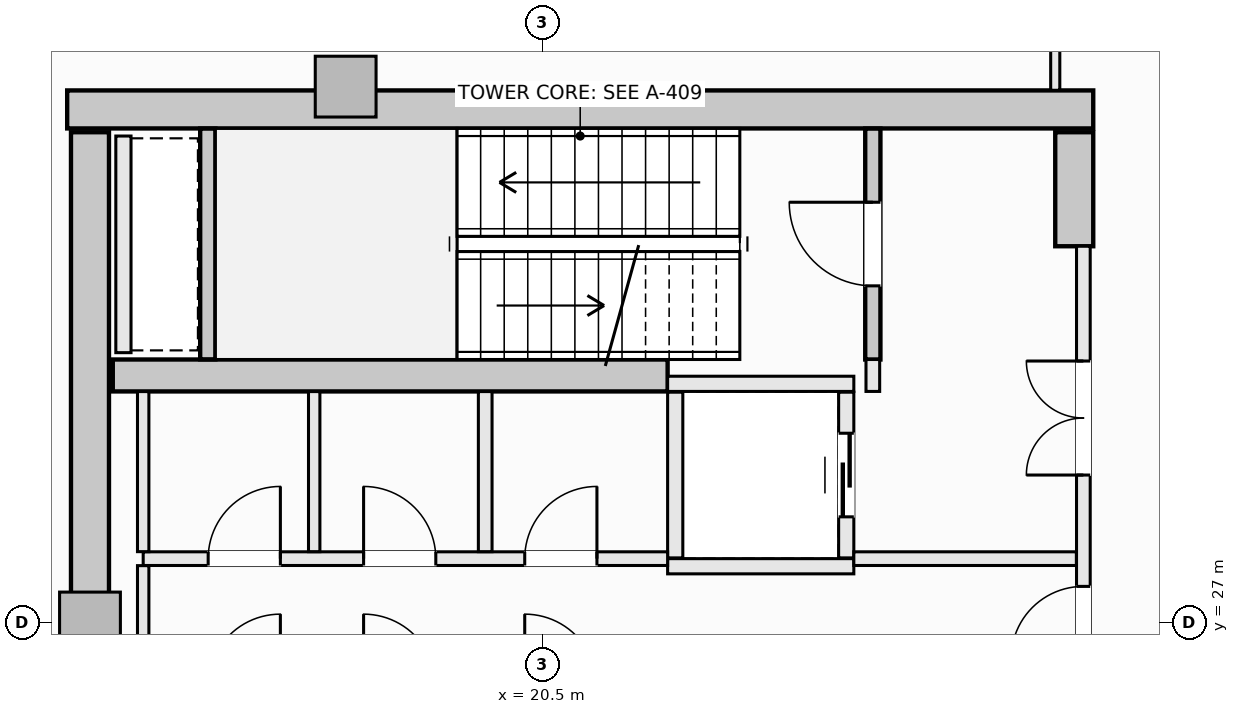
"""IFC4 building model, lengths in metres.
Left out: names, types, materials, properties, quantities, classifications, styles, units other than length and angle.
Written with IfcOpenShell. Run it as: python <this file> out.ifc"""

import sys

from ifc_helpers import new_model, si_unit, direction, frame, frame_2d, origin, origin_2d, place, context, subcontext, project, spatial, rectangle, extrude, element, fill, save


model = new_model("IFC4")
c1 = context("Model", 3, precision=1e-05, world=origin(), true_north=direction((0.0, 1.0)))
c2 = subcontext(c1, "Body", "Model", "MODEL_VIEW")
j1 = project(units=[si_unit("LENGTHUNIT", "METRE"), si_unit("PLANEANGLEUNIT", "RADIAN")], contexts=[c1])
p1 = place(None, origin())
s1 = spatial("IfcSite", under=j1, at=p1, CompositionType="ELEMENT")
p2 = place(p1, origin())
s2 = spatial("IfcBuilding", under=s1, at=p2, CompositionType="ELEMENT")
p3 = place(p2, frame((0.0, 0.0, 191.9)))
s3 = spatial("IfcBuildingStorey", under=s2, at=p3, CompositionType="ELEMENT", Elevation=191.9)
p4 = place(p3, frame((14.25, 33.75, -0.28), z_axis=(0.0, 0.0, 1.0), x_axis=(1.0, 0.0, 0.0)))
e1 = element("IfcWall", 1, at=p4, inside=s3, PredefinedType="SHEAR", context=c2, shape_type="SweptSolid", body=[
    extrude(rectangle(XDim=13.5, YDim=0.5, at=frame_2d((6.75, 0.0))), origin(), (0.0, 0.0, 1.0), 4.51),
])
p5 = place(p3, frame((14.55, 20.55, -0.28), z_axis=(0.0, 0.0, 1.0), x_axis=(0.0, 1.0, 0.0)))
e2 = element("IfcWall", 2, at=p5, inside=s3, PredefinedType="SHEAR", context=c2, shape_type="SweptSolid", body=[
    extrude(rectangle(XDim=12.9, YDim=0.5, at=frame_2d((6.45, 0.0))), origin(), (0.0, 0.0, 1.0), 4.51),
])
p6 = place(p3, frame((27.5, 31.95, -0.28), z_axis=(0.0, 0.0, 1.0), x_axis=(0.0, 1.0, 0.0)))
e3 = element("IfcWall", 3, at=p6, inside=s3, PredefinedType="SHEAR", context=c2, shape_type="SweptSolid", body=[
    extrude(rectangle(XDim=1.5, YDim=0.5, at=frame_2d((0.75, 0.0))), origin(), (0.0, 0.0, 1.0), 4.51),
])
p7 = place(p3, frame((14.85, 30.25, -0.28), z_axis=(0.0, 0.0, 1.0), x_axis=(1.0, 0.0, 0.0)))
e4 = element("IfcWall", 4, at=p7, inside=s3, PredefinedType="SHEAR", context=c2, shape_type="SweptSolid", body=[
    extrude(rectangle(XDim=7.3, YDim=0.42, at=frame_2d((3.65, 0.0))), origin(), (0.0, 0.0, 1.0), 4.51),
])
for number, where, z_axis, x_axis in (
    (5, (17.914, 34.05, -0.28), (0.0, 0.0, 1.0), (1.0, 0.0, 0.0)),
    (6, (14.55, 27.0, -0.28), (0.0, 0.0, 1.0), (1.0, 0.0, 0.0)),
):
    element("IfcColumn", number, at=place(p3, frame(where, z_axis=z_axis, x_axis=x_axis)), inside=s3, PredefinedType="PILASTER", context=c2, shape_type="SweptSolid", body=[
        extrude(rectangle(XDim=0.8, YDim=0.8, at=origin_2d()), origin(), (0.0, 0.0, 1.0), 4.51),
    ])
p8 = place(p3, frame((24.85, 30.46, -0.28), z_axis=(0.0, 0.0, 1.0), x_axis=(0.0, 1.0, 0.0)))
e7 = element("IfcWall", 7, at=p8, inside=s3, PredefinedType="SHEAR", context=c2, shape_type="SweptSolid", body=[
    extrude(rectangle(XDim=3.038, YDim=0.2, at=frame_2d((1.519, 0.0))), origin(), (0.0, 0.0, 1.0), 4.51),
])
p9 = place(p8, frame((0.969, 0.0, 0.28)))
e8 = element("IfcOpeningElement", 8, at=p9, cuts=e7, PredefinedType="OPENING", context=c2, shape_type="SweptSolid", body=[
    extrude(rectangle(XDim=1.1, YDim=2.15, at=frame_2d((0.55, 1.075))), frame((0.0, 0.11, 0.0), z_axis=(0.0, -1.0, 0.0), x_axis=(1.0, 0.0, 0.0)), (0.0, 0.0, 1.0), 0.22),
])
p10 = place(p3, frame((16.1, 30.462, -0.28), z_axis=(0.0, 0.0, 1.0), x_axis=(0.0, 1.0, 0.0)))
e9 = element("IfcWall", 9, at=p10, inside=s3, PredefinedType="SHEAR", context=c2, shape_type="SweptSolid", body=[
    extrude(rectangle(XDim=3.036, YDim=0.2, at=frame_2d((1.518, 0.0))), origin(), (0.0, 0.0, 1.0), 4.51),
])
for number, where, z_axis, x_axis in (
    (10, (22.15, 30.14, 0.0), (0.0, 0.0, 1.0), (1.0, 0.0, 0.0)),
    (11, (22.15, 27.74, 0.0), (0.0, 0.0, 1.0), (1.0, 0.0, 0.0)),
):
    element("IfcWall", number, at=place(p3, frame(where, z_axis=z_axis, x_axis=x_axis)), inside=s3, PredefinedType="SOLIDWALL", context=c2, shape_type="SweptSolid", body=[
        extrude(rectangle(XDim=2.45, YDim=0.2, at=frame_2d((1.225, 0.0))), origin(), (0.0, 0.0, 1.0), 4.23),
    ])
p11 = place(p3, frame((22.25, 27.85, 0.0), z_axis=(0.0, 0.0, 1.0), x_axis=(0.0, 1.0, 0.0)))
e12 = element("IfcWall", 12, at=p11, inside=s3, PredefinedType="SOLIDWALL", context=c2, shape_type="SweptSolid", body=[
    extrude(rectangle(XDim=2.18, YDim=0.2, at=frame_2d((1.09, 0.0))), origin(), (0.0, 0.0, 1.0), 4.23),
])
p12 = place(p3, frame((24.5, 27.85, 0.0), z_axis=(0.0, 0.0, 1.0), x_axis=(0.0, 1.0, 0.0)))
e13 = element("IfcWall", 13, at=p12, inside=s3, PredefinedType="SOLIDWALL", context=c2, shape_type="SweptSolid", body=[
    extrude(rectangle(XDim=2.18, YDim=0.2, at=frame_2d((1.09, 0.0))), origin(), (0.0, 0.0, 1.0), 4.23),
])
p13 = place(p12, frame((0.54, 0.0, 0.0)))
e14 = element("IfcOpeningElement", 14, at=p13, cuts=e13, PredefinedType="OPENING", context=c2, shape_type="SweptSolid", body=[
    extrude(rectangle(XDim=1.1, YDim=2.2, at=frame_2d((0.55, 1.1))), frame((0.0, 0.11, 0.0), z_axis=(0.0, -1.0, 0.0), x_axis=(1.0, 0.0, 0.0)), (0.0, 0.0, 1.0), 0.22),
])
p14 = place(p3, frame((14.99, 30.55, 0.0), z_axis=(0.0, 0.0, 1.0), x_axis=(0.0, 1.0, 0.0)))
e15 = element("IfcWall", 15, at=p14, inside=s3, PredefinedType="SOLIDWALL", context=c2, shape_type="SweptSolid", body=[
    extrude(rectangle(XDim=2.85, YDim=0.2, at=frame_2d((1.425, 0.0))), origin(), (0.0, 0.0, 1.0), 4.23),
])
p15 = place(p3, frame((24.85, 30.04, 0.0), z_axis=(0.0, 0.0, 1.0), x_axis=(0.0, 1.0, 0.0)))
e16 = element("IfcWall", 16, at=p15, inside=s3, PredefinedType="SOLIDWALL", context=c2, shape_type="SweptSolid", body=[
    extrude(rectangle(XDim=0.42, YDim=0.18, at=frame_2d((0.21, 0.0))), origin(), (0.0, 0.0, 1.0), 4.23),
])
p16 = place(p3, frame((27.62, 22.05, 0.0), z_axis=(0.0, 0.0, 1.0), x_axis=(0.0, 1.0, 0.0)))
e17 = element("IfcWall", 17, at=p16, inside=s3, PredefinedType="SOLIDWALL", context=c2, shape_type="SweptSolid", body=[
    extrude(rectangle(XDim=9.9, YDim=0.18, at=frame_2d((4.95, 0.0))), origin(), (0.0, 0.0, 1.0), 3.322),
])
p17 = place(p16, frame((4.475, 0.0, 0.0)))
e18 = element("IfcOpeningElement", 18, at=p17, cuts=e17, PredefinedType="OPENING", context=c2, shape_type="SweptSolid", body=[
    extrude(rectangle(XDim=0.95, YDim=2.1, at=frame_2d((0.475, 1.05))), frame((0.0, 0.1, 0.0), z_axis=(0.0, -1.0, 0.0), x_axis=(1.0, 0.0, 0.0)), (0.0, 0.0, 1.0), 0.2),
])
p18 = place(p16, frame((6.89, 0.0, 0.0)))
e19 = element("IfcOpeningElement", 19, at=p18, cuts=e17, PredefinedType="OPENING", context=c2, shape_type="SweptSolid", body=[
    extrude(rectangle(XDim=1.5, YDim=2.2, at=frame_2d((0.75, 1.1))), frame((0.0, 0.1, 0.0), z_axis=(0.0, -1.0, 0.0), x_axis=(1.0, 0.0, 0.0)), (0.0, 0.0, 1.0), 0.2),
])
p19 = place(p16, frame((1.51, 0.0, 0.0)))
e20 = element("IfcOpeningElement", 20, at=p19, cuts=e17, PredefinedType="OPENING", context=c2, shape_type="SweptSolid", body=[
    extrude(rectangle(XDim=1.5, YDim=2.2, at=frame_2d((0.75, 1.1))), frame((0.0, 0.1, 0.0), z_axis=(0.0, -1.0, 0.0), x_axis=(1.0, 0.0, 0.0)), (0.0, 0.0, 1.0), 0.2),
])
p20 = place(p3, frame((15.25, 27.84, 0.0), z_axis=(0.0, 0.0, 1.0), x_axis=(1.0, 0.0, 0.0)))
e21 = element("IfcWall", 21, at=p20, inside=s3, PredefinedType="SOLIDWALL", context=c2, shape_type="SweptSolid", body=[
    extrude(rectangle(XDim=6.9, YDim=0.18, at=frame_2d((3.45, 0.0))), origin(), (0.0, 0.0, 1.0), 4.23),
])
p21 = place(p20, frame((5.02, 0.0, 0.0)))
e22 = element("IfcOpeningElement", 22, at=p21, cuts=e21, PredefinedType="OPENING", context=c2, shape_type="SweptSolid", body=[
    extrude(rectangle(XDim=0.95, YDim=2.1, at=frame_2d((0.475, 1.05))), frame((0.0, 0.1, 0.0), z_axis=(0.0, -1.0, 0.0), x_axis=(1.0, 0.0, 0.0)), (0.0, 0.0, 1.0), 0.2),
])
p22 = place(p20, frame((0.855, 0.0, 0.0)))
e23 = element("IfcOpeningElement", 23, at=p22, cuts=e21, PredefinedType="OPENING", context=c2, shape_type="SweptSolid", body=[
    extrude(rectangle(XDim=0.95, YDim=2.1, at=frame_2d((0.475, 1.05))), frame((0.0, 0.1, 0.0), z_axis=(0.0, -1.0, 0.0), x_axis=(1.0, 0.0, 0.0)), (0.0, 0.0, 1.0), 0.2),
])
p23 = place(p20, frame((2.9, 0.0, 0.0)))
e24 = element("IfcOpeningElement", 24, at=p23, cuts=e21, PredefinedType="OPENING", context=c2, shape_type="SweptSolid", body=[
    extrude(rectangle(XDim=0.95, YDim=2.1, at=frame_2d((0.475, 1.05))), frame((0.0, 0.1, 0.0), z_axis=(0.0, -1.0, 0.0), x_axis=(1.0, 0.0, 0.0)), (0.0, 0.0, 1.0), 0.2),
])
p24 = place(p3, frame((24.6, 27.84, 0.0), z_axis=(0.0, 0.0, 1.0), x_axis=(1.0, 0.0, 0.0)))
e25 = element("IfcWall", 25, at=p24, inside=s3, PredefinedType="SOLIDWALL", context=c2, shape_type="SweptSolid", body=[
    extrude(rectangle(XDim=2.928, YDim=0.18, at=frame_2d((1.464, 0.0))), origin(), (0.0, 0.0, 1.0), 4.23),
])
p25 = place(p3, frame((15.25, 26.252, 0.0), z_axis=(0.0, 0.0, 1.0), x_axis=(0.0, 1.0, 0.0)))
e26 = element("IfcWall", 26, at=p25, inside=s3, PredefinedType="PARTITIONING", context=c2, shape_type="SweptSolid", body=[
    extrude(rectangle(XDim=1.496, YDim=0.15, at=frame_2d((0.748, 0.0))), origin(), (0.0, 0.0, 1.0), 4.23),
])
p26 = place(p3, frame((15.25, 27.932, 0.0), z_axis=(0.0, 0.0, 1.0), x_axis=(0.0, 1.0, 0.0)))
e27 = element("IfcWall", 27, at=p26, inside=s3, PredefinedType="PARTITIONING", context=c2, shape_type="SweptSolid", body=[
    extrude(rectangle(XDim=2.106, YDim=0.15, at=frame_2d((1.053, 0.0))), origin(), (0.0, 0.0, 1.0), 4.23),
])
p27 = place(p3, frame((19.75, 27.932, 0.0), z_axis=(0.0, 0.0, 1.0), x_axis=(0.0, 1.0, 0.0)))
e28 = element("IfcWall", 28, at=p27, inside=s3, PredefinedType="SOLIDWALL", context=c2, shape_type="SweptSolid", body=[
    extrude(rectangle(XDim=2.106, YDim=0.18, at=frame_2d((1.053, 0.0))), origin(), (0.0, 0.0, 1.0), 4.23),
])
p28 = place(p3, frame((17.5, 27.932, 0.0), z_axis=(0.0, 0.0, 1.0), x_axis=(0.0, 1.0, 0.0)))
e29 = element("IfcWall", 29, at=p28, inside=s3, PredefinedType="PARTITIONING", context=c2, shape_type="SweptSolid", body=[
    extrude(rectangle(XDim=2.106, YDim=0.15, at=frame_2d((1.053, 0.0))), origin(), (0.0, 0.0, 1.0), 4.23),
])
p29 = place(p3, frame((27.25, 34.002, 0.0), z_axis=(0.0, 0.0, 1.0), x_axis=(0.0, 1.0, 0.0)))
e30 = element("IfcWall", 30, at=p29, inside=s3, PredefinedType="PARTITIONING", context=c2, shape_type="SweptSolid", body=[
    extrude(rectangle(XDim=0.956, YDim=0.12, at=frame_2d((0.478, 0.0))), origin(), (0.0, 0.0, 1.0), 4.23),
])
p30 = place(p9, origin())
e31 = element("IfcDoor", 31, at=p30, inside=s3, OperationType="SINGLE_SWING_RIGHT", PredefinedType="DOOR", context=c2, shape_type="SweptSolid", body=[
    extrude(rectangle(XDim=1.1, YDim=2.15, at=frame_2d((0.55, 1.075))), frame((0.0, 0.025, 0.0), z_axis=(0.0, -1.0, 0.0), x_axis=(1.0, 0.0, 0.0)), (0.0, 0.0, 1.0), 0.05),
])
fill(e8, e31)
p31 = place(p13, origin())
e32 = element("IfcDoor", 32, at=p31, inside=s3, OperationType="SLIDING_TO_LEFT", PredefinedType="DOOR", context=c2, shape_type="SweptSolid", body=[
    extrude(rectangle(XDim=1.1, YDim=2.2, at=frame_2d((0.55, 1.1))), frame((0.0, 0.025, 0.0), z_axis=(0.0, -1.0, 0.0), x_axis=(1.0, 0.0, 0.0)), (0.0, 0.0, 1.0), 0.05),
])
fill(e14, e32)
p32 = place(p17, origin())
e33 = element("IfcDoor", 33, at=p32, inside=s3, OperationType="SINGLE_SWING_LEFT", PredefinedType="DOOR", context=c2, shape_type="SweptSolid", body=[
    extrude(rectangle(XDim=0.95, YDim=2.1, at=frame_2d((0.475, 1.05))), frame((0.0, 0.025, 0.0), z_axis=(0.0, -1.0, 0.0), x_axis=(1.0, 0.0, 0.0)), (0.0, 0.0, 1.0), 0.05),
])
fill(e18, e33)
p33 = place(p18, origin())
e34 = element("IfcDoor", 34, at=p33, inside=s3, OperationType="DOUBLE_DOOR_SINGLE_SWING", PredefinedType="DOOR", context=c2, shape_type="SweptSolid", body=[
    extrude(rectangle(XDim=1.5, YDim=2.2, at=frame_2d((0.75, 1.1))), frame((0.0, 0.025, 0.0), z_axis=(0.0, -1.0, 0.0), x_axis=(1.0, 0.0, 0.0)), (0.0, 0.0, 1.0), 0.05),
])
fill(e19, e34)
p34 = place(p21, origin())
e35 = element("IfcDoor", 35, at=p34, inside=s3, OperationType="SINGLE_SWING_RIGHT", PredefinedType="DOOR", context=c2, shape_type="SweptSolid", body=[
    extrude(rectangle(XDim=0.95, YDim=2.1, at=frame_2d((0.475, 1.05))), frame((0.0, 0.025, 0.0), z_axis=(0.0, -1.0, 0.0), x_axis=(1.0, 0.0, 0.0)), (0.0, 0.0, 1.0), 0.05),
])
fill(e22, e35)
p35 = place(p22, origin())
e36 = element("IfcDoor", 36, at=p35, inside=s3, OperationType="SINGLE_SWING_RIGHT", PredefinedType="DOOR", context=c2, shape_type="SweptSolid", body=[
    extrude(rectangle(XDim=0.95, YDim=2.1, at=frame_2d((0.475, 1.05))), frame((0.0, 0.025, 0.0), z_axis=(0.0, -1.0, 0.0), x_axis=(1.0, 0.0, 0.0)), (0.0, 0.0, 1.0), 0.05),
])
fill(e23, e36)
p36 = place(p23, origin())
e37 = element("IfcDoor", 37, at=p36, inside=s3, OperationType="SINGLE_SWING_LEFT", PredefinedType="DOOR", context=c2, shape_type="SweptSolid", body=[
    extrude(rectangle(XDim=0.95, YDim=2.1, at=frame_2d((0.475, 1.05))), frame((0.0, 0.025, 0.0), z_axis=(0.0, -1.0, 0.0), x_axis=(1.0, 0.0, 0.0)), (0.0, 0.0, 1.0), 0.05),
])
fill(e24, e37)
save(model, sys.argv[1])
